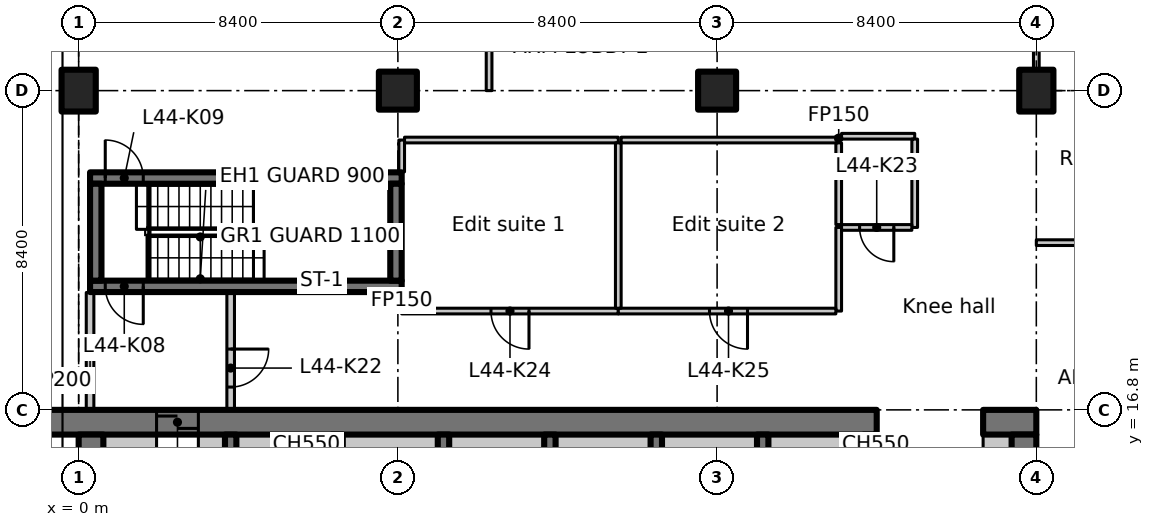
"""IFC4 building model, lengths in metres.
Left out: names, types, materials, properties, quantities, classifications, styles, units other than length and angle.
Written with IfcOpenShell. Run it as: python <this file> out.ifc"""

import sys

from ifc_helpers import new_model, si_unit, direction, frame, frame_2d, origin, origin_2d, place, context, subcontext, project, spatial, polyline, rectangle, outline, extrude, element, fill, save


model = new_model("IFC4")
c1 = context("Model", 3, precision=1e-05, world=origin(), true_north=direction((0.0, 1.0)))
c2 = subcontext(c1, "Body", "Model", "MODEL_VIEW")
j1 = project(units=[si_unit("LENGTHUNIT", "METRE"), si_unit("PLANEANGLEUNIT", "RADIAN")], contexts=[c1])
p1 = place(None, origin())
s1 = spatial("IfcSite", under=j1, at=p1, CompositionType="ELEMENT")
p2 = place(p1, origin())
s2 = spatial("IfcBuilding", under=s1, at=p2, CompositionType="ELEMENT")
p3 = place(p2, frame((0.0, 0.0, 177.6)))
s3 = spatial("IfcBuildingStorey", under=s2, at=p3, CompositionType="ELEMENT", Elevation=177.6)
p4 = place(p3, frame((0.0, 25.2, 0.0), z_axis=(0.0, 0.0, 1.0), x_axis=(1.0, 0.0, 0.0)))
e1 = element("IfcColumn", 1, at=p4, inside=s3, PredefinedType="COLUMN", context=c2, shape_type="SweptSolid", body=[
    extrude(rectangle(XDim=0.9, YDim=1.1, at=origin_2d()), origin(), (0.0, 0.0, 1.0), 3.35),
])
for number, where, z_axis, x_axis in (
    (2, (8.4, 25.2, 0.0), (0.0, 0.0, 1.0), (1.0, 0.0, 0.0)),
    (3, (16.8, 25.2, 0.0), (0.0, 0.0, 1.0), (1.0, 0.0, 0.0)),
):
    element("IfcColumn", number, at=place(p3, frame(where, z_axis=z_axis, x_axis=x_axis)), inside=s3, PredefinedType="COLUMN", context=c2, shape_type="SweptSolid", body=[
        extrude(rectangle(XDim=1.0, YDim=1.0, at=origin_2d()), origin(), (0.0, 0.0, 1.0), 3.35),
    ])
p5 = place(p3, frame((25.2, 25.2, 0.0), z_axis=(0.0, 0.0, 1.0), x_axis=(1.0, 0.0, 0.0)))
e4 = element("IfcColumn", 4, at=p5, inside=s3, PredefinedType="COLUMN", context=c2, shape_type="SweptSolid", body=[
    extrude(rectangle(XDim=0.9, YDim=1.1, at=origin_2d()), origin(), (0.0, 0.0, 1.0), 3.35),
])
p6 = place(p3, frame((-1.1, 16.475, 0.0), z_axis=(0.0, 0.0, 1.0), x_axis=(1.0, 0.0, 0.0)))
e5 = element("IfcWall", 5, at=p6, inside=s3, PredefinedType="SHEAR", context=c2, shape_type="SweptSolid", body=[
    extrude(rectangle(XDim=22.1, YDim=0.65, at=frame_2d((11.05, 0.0))), origin(), (0.0, 0.0, 1.0), 3.35),
])
p7 = place(p6, frame((3.15, 0.0, 0.0)))
e6 = element("IfcOpeningElement", 6, at=p7, cuts=e5, PredefinedType="OPENING", context=c2, shape_type="SweptSolid", body=[
    extrude(rectangle(XDim=1.1, YDim=2.3, at=frame_2d((0.55, 1.15))), frame((0.0, 0.335, 0.0), z_axis=(0.0, -1.0, 0.0), x_axis=(1.0, 0.0, 0.0)), (0.0, 0.0, 1.0), 0.67),
])
p8 = place(p3, frame((23.8, 16.475, 0.0), z_axis=(0.0, 0.0, 1.0), x_axis=(1.0, 0.0, 0.0)))
e7 = element("IfcWall", 7, at=p8, inside=s3, PredefinedType="SHEAR", context=c2, shape_type="SweptSolid", body=[
    extrude(rectangle(XDim=1.4, YDim=0.65, at=frame_2d((0.7, 0.0))), origin(), (0.0, 0.0, 1.0), 3.35),
])
p9 = place(p3, frame((0.325, 7.286, 0.0), z_axis=(0.0, 0.0, 1.0), x_axis=(0.0, 1.0, 0.0)))
e8 = element("IfcWall", 8, at=p9, inside=s3, PredefinedType="SHEAR", context=c2, shape_type="SweptSolid", body=[
    extrude(rectangle(XDim=8.864, YDim=0.65, at=frame_2d((4.432, 0.0))), origin(), (0.0, 0.0, 1.0), 3.35),
])
p10 = place(p3, frame((24.875, 12.6, 0.0), z_axis=(0.0, 0.0, 1.0), x_axis=(0.0, 1.0, 0.0)))
e9 = element("IfcWall", 9, at=p10, inside=s3, PredefinedType="SHEAR", context=c2, shape_type="SweptSolid", body=[
    extrude(rectangle(XDim=3.55, YDim=0.65, at=frame_2d((1.775, 0.0))), origin(), (0.0, 0.0, 1.0), 3.35),
])
p11 = place(p3, frame((0.65, 15.875, 0.0), z_axis=(0.0, 0.0, 1.0), x_axis=(1.0, 0.0, 0.0)))
e10 = element("IfcWall", 10, at=p11, inside=s3, PredefinedType="PARTITIONING", context=c2, shape_type="SweptSolid", body=[
    extrude(rectangle(XDim=1.4, YDim=0.55, at=frame_2d((0.7, 0.0))), origin(), (0.0, 0.0, 1.0), 3.35),
])
p12 = place(p3, frame((23.8, 15.875, 0.0), z_axis=(0.0, 0.0, 1.0), x_axis=(1.0, 0.0, 0.0)))
e11 = element("IfcWall", 11, at=p12, inside=s3, PredefinedType="PARTITIONING", context=c2, shape_type="SweptSolid", body=[
    extrude(rectangle(XDim=0.75, YDim=0.55, at=frame_2d((0.375, 0.0))), origin(), (0.0, 0.0, 1.0), 3.35),
])
for number, where, z_axis, x_axis in (
    (12, (4.0, 12.95, 0.0), (0.0, 0.0, 1.0), (0.0, 1.0, 0.0)),
    (13, (6.8, 12.95, 0.0), (0.0, 0.0, 1.0), (0.0, 1.0, 0.0)),
    (14, (9.6, 12.95, 0.0), (0.0, 0.0, 1.0), (0.0, 1.0, 0.0)),
    (15, (12.4, 12.95, 0.0), (0.0, 0.0, 1.0), (0.0, 1.0, 0.0)),
    (16, (15.2, 12.95, 0.0), (0.0, 0.0, 1.0), (0.0, 1.0, 0.0)),
    (17, (18.0, 12.95, 0.0), (0.0, 0.0, 1.0), (0.0, 1.0, 0.0)),
    (18, (20.8, 12.95, 0.0), (0.0, 0.0, 1.0), (0.0, 1.0, 0.0)),
):
    element("IfcWall", number, at=place(p3, frame(where, z_axis=z_axis, x_axis=x_axis)), inside=s3, PredefinedType="SHEAR", context=c2, shape_type="SweptSolid", body=[
        extrude(rectangle(XDim=3.2, YDim=0.3, at=frame_2d((1.6, 0.0))), origin(), (0.0, 0.0, 1.0), 3.35),
    ])
p13 = place(p3, frame((8.5, 20.05, 0.0), z_axis=(0.0, 0.0, 1.0), x_axis=(-1.0, 0.0, 0.0)))
e19 = element("IfcWall", 19, at=p13, inside=s3, PredefinedType="SHEAR", context=c2, shape_type="SweptSolid", body=[
    extrude(rectangle(XDim=8.2, YDim=0.3, at=frame_2d((4.1, 0.0))), origin(), (0.0, 0.0, 1.0), 3.35),
])
p14 = place(p13, frame((6.8, 0.0, 0.0)))
e20 = element("IfcOpeningElement", 20, at=p14, cuts=e19, PredefinedType="OPENING", context=c2, shape_type="SweptSolid", body=[
    extrude(rectangle(XDim=1.0, YDim=2.1, at=frame_2d((0.5, 1.05))), frame((0.0, 0.16, 0.0), z_axis=(0.0, -1.0, 0.0), x_axis=(1.0, 0.0, 0.0)), (0.0, 0.0, 1.0), 0.32),
])
p15 = place(p3, frame((0.3, 22.9, 0.0), z_axis=(0.0, 0.0, 1.0), x_axis=(1.0, 0.0, 0.0)))
e21 = element("IfcWall", 21, at=p15, inside=s3, PredefinedType="SHEAR", context=c2, shape_type="SweptSolid", body=[
    extrude(rectangle(XDim=8.2, YDim=0.3, at=frame_2d((4.1, 0.0))), origin(), (0.0, 0.0, 1.0), 3.35),
])
p16 = place(p15, frame((0.4, 0.0, 0.0)))
e22 = element("IfcOpeningElement", 22, at=p16, cuts=e21, PredefinedType="OPENING", context=c2, shape_type="SweptSolid", body=[
    extrude(rectangle(XDim=1.0, YDim=2.1, at=frame_2d((0.5, 1.05))), frame((0.0, 0.16, 0.0), z_axis=(0.0, -1.0, 0.0), x_axis=(1.0, 0.0, 0.0)), (0.0, 0.0, 1.0), 0.32),
])
for number, where, z_axis, x_axis in (
    (23, (0.45, 20.2, 0.0), (0.0, 0.0, 1.0), (0.0, 1.0, 0.0)),
    (24, (8.35, 20.2, 0.0), (0.0, 0.0, 1.0), (0.0, 1.0, 0.0)),
):
    element("IfcWall", number, at=place(p3, frame(where, z_axis=z_axis, x_axis=x_axis)), inside=s3, PredefinedType="SHEAR", context=c2, shape_type="SweptSolid", body=[
        extrude(rectangle(XDim=2.55, YDim=0.3, at=frame_2d((1.275, 0.0))), origin(), (0.0, 0.0, 1.0), 3.35),
    ])
p17 = place(p3, frame((0.3, 16.812, 0.0), z_axis=(0.0, 0.0, 1.0), x_axis=(0.0, 1.0, 0.0)))
e25 = element("IfcWall", 25, at=p17, inside=s3, PredefinedType="PARTITIONING", context=c2, shape_type="SweptSolid", body=[
    extrude(rectangle(XDim=3.076, YDim=0.2, at=frame_2d((1.538, 0.0))), origin(), (0.0, 0.0, 1.0), 2.98),
])
p18 = place(p3, frame((4.0, 19.888, 0.0), z_axis=(0.0, 0.0, 1.0), x_axis=(0.0, -1.0, 0.0)))
e26 = element("IfcWall", 26, at=p18, inside=s3, PredefinedType="PARTITIONING", context=c2, shape_type="SweptSolid", body=[
    extrude(rectangle(XDim=3.076, YDim=0.2, at=frame_2d((1.538, 0.0))), origin(), (0.0, 0.0, 1.0), 3.35),
])
p19 = place(p18, frame((1.488, 0.0, 0.0)))
e27 = element("IfcOpeningElement", 27, at=p19, cuts=e26, PredefinedType="OPENING", context=c2, shape_type="SweptSolid", body=[
    extrude(rectangle(XDim=1.0, YDim=2.1, at=frame_2d((0.5, 1.05))), frame((0.0, 0.11, 0.0), z_axis=(0.0, -1.0, 0.0), x_axis=(1.0, 0.0, 0.0)), (0.0, 0.0, 1.0), 0.22),
])
p20 = place(p3, frame((14.2, 19.4, 0.0), z_axis=(0.0, 0.0, 1.0), x_axis=(-1.0, 0.0, 0.0)))
e28 = element("IfcWall", 28, at=p20, inside=s3, PredefinedType="PARTITIONING", context=c2, shape_type="SweptSolid", body=[
    extrude(rectangle(XDim=5.7, YDim=0.15, at=frame_2d((2.85, 0.0))), origin(), (0.0, 0.0, 1.0), 3.35),
])
p21 = place(p20, frame((2.35, 0.0, 0.0)))
e29 = element("IfcOpeningElement", 29, at=p21, cuts=e28, PredefinedType="OPENING", context=c2, shape_type="SweptSolid", body=[
    extrude(rectangle(XDim=1.0, YDim=2.1, at=frame_2d((0.5, 1.05))), frame((0.0, 0.085, 0.0), z_axis=(0.0, -1.0, 0.0), x_axis=(1.0, 0.0, 0.0)), (0.0, 0.0, 1.0), 0.17),
])
p22 = place(p3, frame((8.5, 19.475, 0.0), z_axis=(0.0, 0.0, 1.0), x_axis=(0.0, 1.0, 0.0)))
e30 = element("IfcWall", 30, at=p22, inside=s3, PredefinedType="PARTITIONING", context=c2, shape_type="SweptSolid", body=[
    extrude(rectangle(XDim=0.413, YDim=0.15, at=frame_2d((0.207, 0.0))), origin(), (0.0, 0.0, 1.0), 3.35),
])
p23 = place(p3, frame((8.5, 23.062, 0.0), z_axis=(0.0, 0.0, 1.0), x_axis=(0.0, 1.0, 0.0)))
e31 = element("IfcWall", 31, at=p23, inside=s3, PredefinedType="PARTITIONING", context=c2, shape_type="SweptSolid", body=[
    extrude(rectangle(XDim=0.838, YDim=0.15, at=frame_2d((0.419, 0.0))), origin(), (0.0, 0.0, 1.0), 3.35),
])
p24 = place(p3, frame((8.575, 23.9, 0.0), z_axis=(0.0, 0.0, 1.0), x_axis=(1.0, 0.0, 0.0)))
e32 = element("IfcWall", 32, at=p24, inside=s3, PredefinedType="PARTITIONING", context=c2, shape_type="SweptSolid", body=[
    extrude(rectangle(XDim=5.625, YDim=0.15, at=frame_2d((2.812, 0.0))), origin(), (0.0, 0.0, 1.0), 3.35),
])
p25 = place(p3, frame((20.0, 21.6, 0.0), z_axis=(0.0, 0.0, 1.0), x_axis=(0.0, -1.0, 0.0)))
e33 = element("IfcWall", 33, at=p25, inside=s3, PredefinedType="PARTITIONING", context=c2, shape_type="SweptSolid", body=[
    extrude(rectangle(XDim=2.2, YDim=0.15, at=frame_2d((1.1, 0.0))), origin(), (0.0, 0.0, 1.0), 3.35),
])
p26 = place(p3, frame((19.925, 19.4, 0.0), z_axis=(0.0, 0.0, 1.0), x_axis=(-1.0, 0.0, 0.0)))
e34 = element("IfcWall", 34, at=p26, inside=s3, PredefinedType="PARTITIONING", context=c2, shape_type="SweptSolid", body=[
    extrude(rectangle(XDim=5.725, YDim=0.15, at=frame_2d((2.863, 0.0))), origin(), (0.0, 0.0, 1.0), 3.35),
])
p27 = place(p26, frame((2.325, 0.0, 0.0)))
e35 = element("IfcOpeningElement", 35, at=p27, cuts=e34, PredefinedType="OPENING", context=c2, shape_type="SweptSolid", body=[
    extrude(rectangle(XDim=1.0, YDim=2.1, at=frame_2d((0.5, 1.05))), frame((0.0, 0.085, 0.0), z_axis=(0.0, -1.0, 0.0), x_axis=(1.0, 0.0, 0.0)), (0.0, 0.0, 1.0), 0.17),
])
p28 = place(p3, frame((14.2, 23.825, 0.0), z_axis=(0.0, 0.0, 1.0), x_axis=(0.0, -1.0, 0.0)))
e36 = element("IfcWall", 36, at=p28, inside=s3, PredefinedType="PARTITIONING", context=c2, shape_type="SweptSolid", body=[
    extrude(rectangle(XDim=4.35, YDim=0.15, at=frame_2d((2.175, 0.0))), origin(), (0.0, 0.0, 1.0), 3.35),
])
p29 = place(p3, frame((14.275, 23.9, 0.0), z_axis=(0.0, 0.0, 1.0), x_axis=(1.0, 0.0, 0.0)))
e37 = element("IfcWall", 37, at=p29, inside=s3, PredefinedType="PARTITIONING", context=c2, shape_type="SweptSolid", body=[
    extrude(rectangle(XDim=5.725, YDim=0.15, at=frame_2d((2.863, 0.0))), origin(), (0.0, 0.0, 1.0), 3.35),
])
p30 = place(p3, frame((20.0, 23.9, 0.0), z_axis=(0.0, 0.0, 1.0), x_axis=(0.0, 1.0, 0.0)))
e38 = element("IfcWall", 38, at=p30, inside=s3, PredefinedType="PARTITIONING", context=c2, shape_type="SweptSolid", body=[
    extrude(rectangle(XDim=0.1, YDim=0.15, at=frame_2d((0.05, 0.0))), origin(), (0.0, 0.0, 1.0), 3.35),
])
p31 = place(p3, frame((20.075, 24.0, 0.0), z_axis=(0.0, 0.0, 1.0), x_axis=(1.0, 0.0, 0.0)))
e39 = element("IfcWall", 39, at=p31, inside=s3, PredefinedType="PARTITIONING", context=c2, shape_type="SweptSolid", body=[
    extrude(rectangle(XDim=1.925, YDim=0.15, at=frame_2d((0.962, 0.0))), origin(), (0.0, 0.0, 1.0), 3.35),
])
p32 = place(p3, frame((22.0, 23.925, 0.0), z_axis=(0.0, 0.0, 1.0), x_axis=(0.0, -1.0, 0.0)))
e40 = element("IfcWall", 40, at=p32, inside=s3, PredefinedType="PARTITIONING", context=c2, shape_type="SweptSolid", body=[
    extrude(rectangle(XDim=2.325, YDim=0.15, at=frame_2d((1.163, 0.0))), origin(), (0.0, 0.0, 1.0), 3.35),
])
p33 = place(p3, frame((21.925, 21.6, 0.0), z_axis=(0.0, 0.0, 1.0), x_axis=(-1.0, 0.0, 0.0)))
e41 = element("IfcWall", 41, at=p33, inside=s3, PredefinedType="PARTITIONING", context=c2, shape_type="SweptSolid", body=[
    extrude(rectangle(XDim=1.85, YDim=0.15, at=frame_2d((0.925, 0.0))), origin(), (0.0, 0.0, 1.0), 3.35),
])
p34 = place(p33, frame((0.475, 0.0, 0.0)))
e42 = element("IfcOpeningElement", 42, at=p34, cuts=e41, PredefinedType="OPENING", context=c2, shape_type="SweptSolid", body=[
    extrude(rectangle(XDim=0.9, YDim=2.1, at=frame_2d((0.45, 1.05))), frame((0.0, 0.085, 0.0), z_axis=(0.0, -1.0, 0.0), x_axis=(1.0, 0.0, 0.0)), (0.0, 0.0, 1.0), 0.17),
])
p35 = place(p3, frame((20.0, 21.675, 0.0), z_axis=(0.0, 0.0, 1.0), x_axis=(0.0, 1.0, 0.0)))
e43 = element("IfcWall", 43, at=p35, inside=s3, PredefinedType="PARTITIONING", context=c2, shape_type="SweptSolid", body=[
    extrude(rectangle(XDim=2.15, YDim=0.15, at=frame_2d((1.075, 0.0))), origin(), (0.0, 0.0, 1.0), 3.35),
])
p36 = place(p3, frame((3.15, 15.875, 0.0), z_axis=(0.0, 0.0, 1.0), x_axis=(1.0, 0.0, 0.0)))
e44 = element("IfcWall", 44, at=p36, inside=s3, PredefinedType="PARTITIONING", context=c2, shape_type="SweptSolid", body=[
    extrude(rectangle(XDim=0.7, YDim=0.55, at=frame_2d((0.35, 0.0))), origin(), (0.0, 0.0, 1.0), 3.35),
])
for number, where, z_axis, x_axis in (
    (45, (4.15, 15.875, 0.0), (0.0, 0.0, 1.0), (1.0, 0.0, 0.0)),
    (46, (6.95, 15.875, 0.0), (0.0, 0.0, 1.0), (1.0, 0.0, 0.0)),
    (47, (9.75, 15.875, 0.0), (0.0, 0.0, 1.0), (1.0, 0.0, 0.0)),
    (48, (12.55, 15.875, 0.0), (0.0, 0.0, 1.0), (1.0, 0.0, 0.0)),
    (49, (15.35, 15.875, 0.0), (0.0, 0.0, 1.0), (1.0, 0.0, 0.0)),
    (50, (18.15, 15.875, 0.0), (0.0, 0.0, 1.0), (1.0, 0.0, 0.0)),
):
    element("IfcWall", number, at=place(p3, frame(where, z_axis=z_axis, x_axis=x_axis)), inside=s3, PredefinedType="PARTITIONING", context=c2, shape_type="SweptSolid", body=[
        extrude(rectangle(XDim=2.5, YDim=0.55, at=frame_2d((1.25, 0.0))), origin(), (0.0, 0.0, 1.0), 3.35),
    ])
p37 = place(p3, frame((20.95, 15.875, 0.0), z_axis=(0.0, 0.0, 1.0), x_axis=(1.0, 0.0, 0.0)))
e51 = element("IfcWall", 51, at=p37, inside=s3, PredefinedType="PARTITIONING", context=c2, shape_type="SweptSolid", body=[
    extrude(rectangle(XDim=0.05, YDim=0.55, at=frame_2d((0.025, 0.0))), origin(), (0.0, 0.0, 1.0), 3.35),
])
p38 = place(p3, frame((25.2, 21.2, 0.0), z_axis=(0.0, 0.0, 1.0), x_axis=(1.0, 0.0, 0.0)))
e52 = element("IfcWall", 52, at=p38, inside=s3, PredefinedType="PARTITIONING", context=c2, shape_type="SweptSolid", body=[
    extrude(rectangle(XDim=4.2, YDim=0.15, at=frame_2d((2.1, 0.0))), origin(), (0.0, 0.0, 1.0), 3.33),
])
p39 = place(p3, frame((25.2, 31.0, 0.0), z_axis=(0.0, 0.0, 1.0), x_axis=(0.0, -1.0, 0.0)))
e53 = element("IfcWall", 53, at=p39, inside=s3, PredefinedType="PARTITIONING", context=c2, shape_type="SweptSolid", body=[
    extrude(outline(polyline([(0.0, 0.0), (5.23, 0.0), (5.23, 2.98), (0.0, 2.98), (0.0, 0.0)])), frame((0.0, 0.075, 0.0), z_axis=(0.0, -1.0, 0.0), x_axis=(1.0, 0.0, 0.0)), (0.0, 0.0, 1.0), 0.15),
])
p40 = place(p39, frame((2.03, 0.0, 0.0)))
e54 = element("IfcOpeningElement", 54, at=p40, cuts=e53, PredefinedType="OPENING", context=c2, shape_type="SweptSolid", body=[
    extrude(rectangle(XDim=1.1, YDim=2.1, at=frame_2d((0.55, 1.05))), frame((0.0, 0.085, 0.0), z_axis=(0.0, -1.0, 0.0), x_axis=(1.0, 0.0, 0.0)), (0.0, 0.0, 1.0), 0.17),
])
p41 = place(p3, frame((10.8, 25.2, 0.0), z_axis=(0.0, 0.0, 1.0), x_axis=(0.0, 1.0, 0.0)))
e55 = element("IfcWall", 55, at=p41, inside=s3, PredefinedType="PARTITIONING", context=c2, shape_type="SweptSolid", body=[
    extrude(rectangle(XDim=8.4, YDim=0.15, at=frame_2d((4.2, 0.0))), origin(), (0.0, 0.0, 1.0), 3.33),
])
p42 = place(p41, frame((3.3, 0.0, 0.0)))
e56 = element("IfcOpeningElement", 56, at=p42, cuts=e55, PredefinedType="OPENING", context=c2, shape_type="SweptSolid", body=[
    extrude(rectangle(XDim=1.6, YDim=2.1, at=frame_2d((0.8, 1.05))), frame((0.0, 0.085, 0.0), z_axis=(0.0, -1.0, 0.0), x_axis=(1.0, 0.0, 0.0)), (0.0, 0.0, 1.0), 0.17),
])
p43 = place(p7, origin())
e57 = element("IfcDoor", 57, at=p43, inside=s3, OperationType="SLIDING_TO_LEFT", PredefinedType="DOOR", context=c2, shape_type="SweptSolid", body=[
    extrude(rectangle(XDim=1.1, YDim=2.3, at=frame_2d((0.55, 1.15))), frame((0.0, 0.025, 0.0), z_axis=(0.0, -1.0, 0.0), x_axis=(1.0, 0.0, 0.0)), (0.0, 0.0, 1.0), 0.05),
])
fill(e6, e57)
p44 = place(p14, origin())
e58 = element("IfcDoor", 58, at=p44, inside=s3, OperationType="SINGLE_SWING_LEFT", PredefinedType="DOOR", context=c2, shape_type="SweptSolid", body=[
    extrude(rectangle(XDim=1.0, YDim=2.1, at=frame_2d((0.5, 1.05))), frame((0.0, 0.025, 0.0), z_axis=(0.0, -1.0, 0.0), x_axis=(1.0, 0.0, 0.0)), (0.0, 0.0, 1.0), 0.05),
])
fill(e20, e58)
p45 = place(p16, origin())
e59 = element("IfcDoor", 59, at=p45, inside=s3, OperationType="SINGLE_SWING_RIGHT", PredefinedType="DOOR", context=c2, shape_type="SweptSolid", body=[
    extrude(rectangle(XDim=1.0, YDim=2.1, at=frame_2d((0.5, 1.05))), frame((0.0, 0.025, 0.0), z_axis=(0.0, -1.0, 0.0), x_axis=(1.0, 0.0, 0.0)), (0.0, 0.0, 1.0), 0.05),
])
fill(e22, e59)
p46 = place(p19, origin())
e60 = element("IfcDoor", 60, at=p46, inside=s3, OperationType="SINGLE_SWING_LEFT", PredefinedType="DOOR", context=c2, shape_type="SweptSolid", body=[
    extrude(rectangle(XDim=1.0, YDim=2.1, at=frame_2d((0.5, 1.05))), frame((0.0, 0.025, 0.0), z_axis=(0.0, -1.0, 0.0), x_axis=(1.0, 0.0, 0.0)), (0.0, 0.0, 1.0), 0.05),
])
fill(e27, e60)
p47 = place(p34, origin())
e61 = element("IfcDoor", 61, at=p47, inside=s3, OperationType="SINGLE_SWING_RIGHT", PredefinedType="DOOR", context=c2, shape_type="SweptSolid", body=[
    extrude(rectangle(XDim=0.9, YDim=2.1, at=frame_2d((0.45, 1.05))), frame((0.0, 0.025, 0.0), z_axis=(0.0, -1.0, 0.0), x_axis=(1.0, 0.0, 0.0)), (0.0, 0.0, 1.0), 0.05),
])
fill(e42, e61)
p48 = place(p21, origin())
e62 = element("IfcDoor", 62, at=p48, inside=s3, OperationType="SINGLE_SWING_LEFT", PredefinedType="DOOR", context=c2, shape_type="SweptSolid", body=[
    extrude(rectangle(XDim=1.0, YDim=2.1, at=frame_2d((0.5, 1.05))), frame((0.0, 0.025, 0.0), z_axis=(0.0, -1.0, 0.0), x_axis=(1.0, 0.0, 0.0)), (0.0, 0.0, 1.0), 0.05),
])
fill(e29, e62)
p49 = place(p27, origin())
e63 = element("IfcDoor", 63, at=p49, inside=s3, OperationType="SINGLE_SWING_RIGHT", PredefinedType="DOOR", context=c2, shape_type="SweptSolid", body=[
    extrude(rectangle(XDim=1.0, YDim=2.1, at=frame_2d((0.5, 1.05))), frame((0.0, 0.025, 0.0), z_axis=(0.0, -1.0, 0.0), x_axis=(1.0, 0.0, 0.0)), (0.0, 0.0, 1.0), 0.05),
])
fill(e35, e63)
save(model, sys.argv[1])
